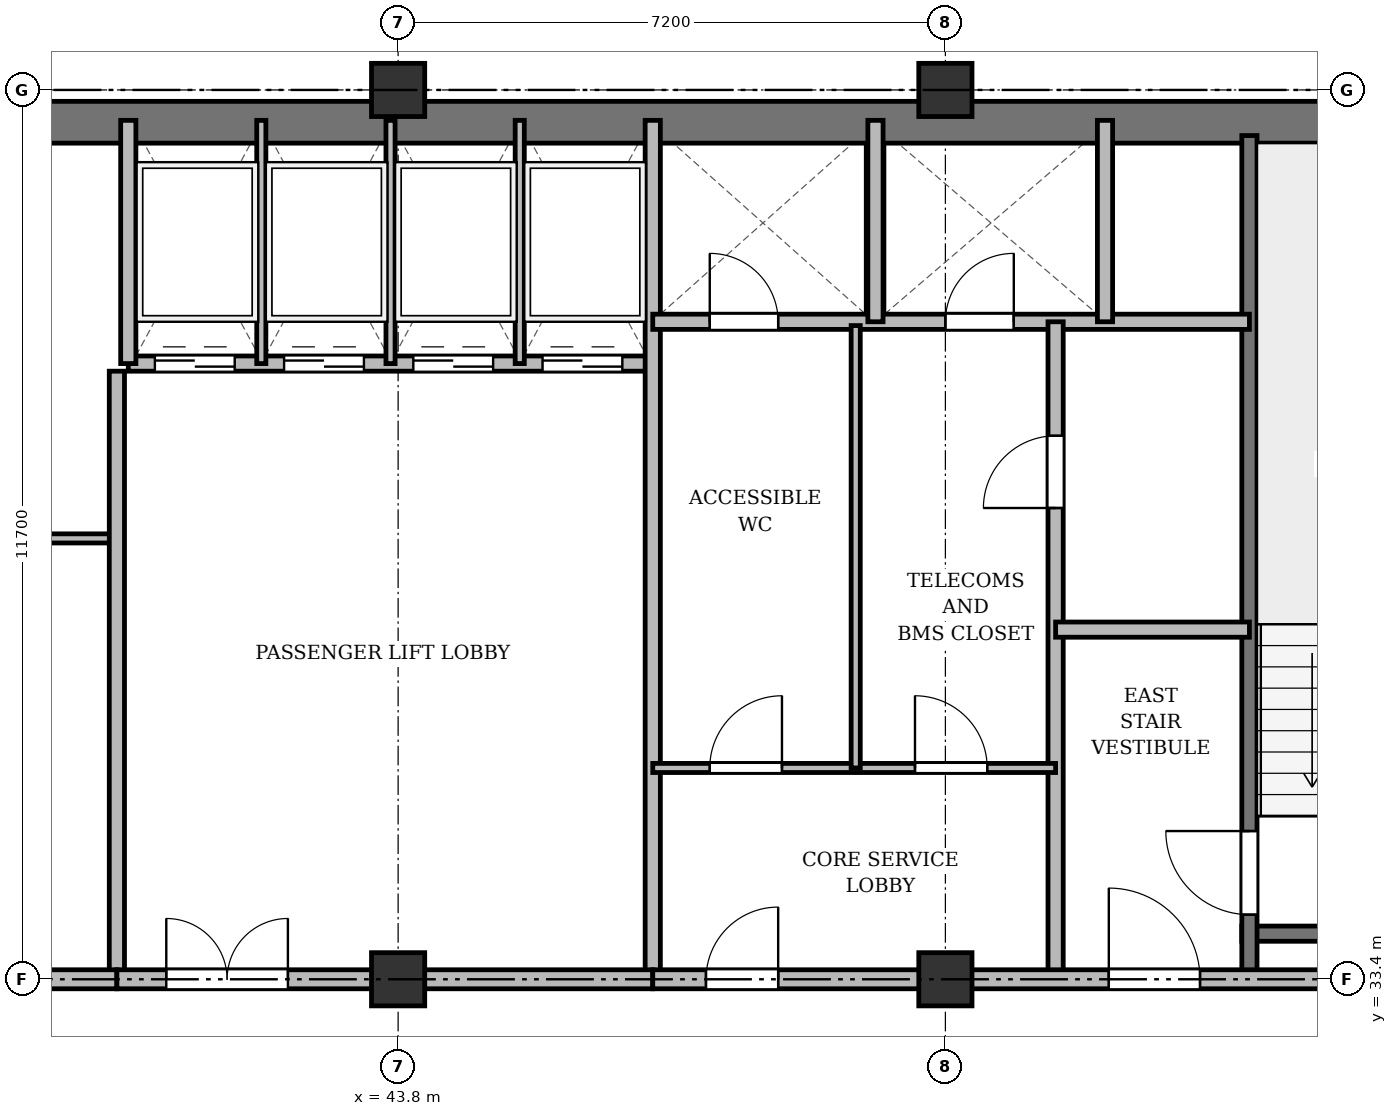
"""IFC4 building model, lengths in metres.
Left out: names, types, materials, properties, quantities, classifications, styles, units other than length and angle.
Written with IfcOpenShell. Run it as: python <this file> out.ifc"""

import sys

from ifc_helpers import new_model, si_unit, direction, frame, frame_2d, origin, origin_2d, place, context, subcontext, project, spatial, rectangle, extrude, source, transform, mapped, element, fill, save


model = new_model("IFC4")
c1 = context("Model", 3, precision=1e-05, world=origin(), true_north=direction((0.0, 1.0)))
c2 = subcontext(c1, "Body", "Model", "MODEL_VIEW")
j1 = project(units=[si_unit("LENGTHUNIT", "METRE"), si_unit("PLANEANGLEUNIT", "RADIAN")], contexts=[c1])
p1 = place(None, origin())
s1 = spatial("IfcSite", under=j1, at=p1, CompositionType="ELEMENT")
p2 = place(p1, origin())
s2 = spatial("IfcBuilding", under=s1, at=p2, CompositionType="ELEMENT")
p3 = place(p2, frame((0.0, 0.0, 237.3)))
s3 = spatial("IfcBuildingStorey", under=s2, at=p3, CompositionType="ELEMENT", Elevation=237.3)
m1 = source(origin(), c2, "Body", "SweptSolid", [
    extrude(rectangle(XDim=0.7, YDim=0.7, at=origin_2d()), origin(), (0.0, 0.0, 1.0), 3.6),
])
for number, where, z_axis, x_axis in (
    (1, (43.8, 33.4, 0.0), (0.0, 0.0, 1.0), (1.0, 0.0, 0.0)),
    (2, (43.8, 45.1, 0.0), (0.0, 0.0, 1.0), (1.0, 0.0, 0.0)),
    (3, (51.0, 33.4, 0.0), (0.0, 0.0, 1.0), (1.0, 0.0, 0.0)),
    (4, (51.0, 45.1, 0.0), (0.0, 0.0, 1.0), (1.0, 0.0, 0.0)),
):
    element("IfcColumn", number, at=place(p3, frame(where, z_axis=z_axis, x_axis=x_axis)), inside=s3, PredefinedType="COLUMN", context=c2, shape_type="MappedRepresentation", body=[
        mapped(m1, transform((0.0, 0.0, 0.0), x_axis=(1.0, 0.0, 0.0), y_axis=(0.0, 1.0, 0.0), z_axis=(0.0, 0.0, 1.0), scale=1.0)),
    ])
p4 = place(p3, frame((15.65, 44.675, 0.0), z_axis=(0.0, 0.0, 1.0), x_axis=(1.0, 0.0, 0.0)))
e5 = element("IfcWall", 5, at=p4, inside=s3, PredefinedType="SHEAR", context=c2, shape_type="SweptSolid", body=[
    extrude(rectangle(XDim=43.1, YDim=0.55, at=frame_2d((21.55, 0.0))), origin(), (0.0, 0.0, 1.0), 3.22),
])
p5 = place(p3, frame((54.9, 34.0, 0.0), z_axis=(0.0, 0.0, 1.0), x_axis=(1.0, 0.0, 0.0)))
e6 = element("IfcWall", 6, at=p5, inside=s3, PredefinedType="SHEAR", context=c2, shape_type="SweptSolid", body=[
    extrude(rectangle(XDim=3.4, YDim=0.2, at=frame_2d((1.7, 0.0))), origin(), (0.0, 0.0, 1.0), 3.22),
])
p6 = place(p3, frame((55.0, 33.4, 0.0), z_axis=(0.0, 0.0, 1.0), x_axis=(0.0, 1.0, 0.0)))
e7 = element("IfcWall", 7, at=p6, inside=s3, PredefinedType="SHEAR", context=c2, shape_type="SweptSolid", body=[
    extrude(rectangle(XDim=11.1, YDim=0.2, at=frame_2d((5.55, 0.0))), origin(), (0.0, 0.0, 1.0), 3.22),
])
p7 = place(p6, frame((0.85, 0.0, 0.0)))
e8 = element("IfcOpeningElement", 8, at=p7, cuts=e7, PredefinedType="OPENING", context=c2, shape_type="SweptSolid", body=[
    extrude(rectangle(XDim=1.1, YDim=2.15, at=frame_2d((0.55, 1.075))), frame((0.0, 0.11, 0.0), z_axis=(0.0, -1.0, 0.0), x_axis=(1.0, 0.0, 0.0)), (0.0, 0.0, 1.0), 0.22),
])
p8 = place(p3, frame((33.3, 39.2, 0.0), z_axis=(0.0, 0.0, 1.0), x_axis=(1.0, 0.0, 0.0)))
e9 = element("IfcWall", 9, at=p8, inside=s3, PredefinedType="PARTITIONING", context=c2, shape_type="SweptSolid", body=[
    extrude(rectangle(XDim=6.8, YDim=0.12, at=frame_2d((3.4, 0.0))), origin(), (0.0, 0.0, 1.0), 3.22),
])
p9 = place(p8, frame((2.6, 0.0, 0.0)))
e10 = element("IfcOpeningElement", 10, at=p9, cuts=e9, PredefinedType="OPENING", context=c2, shape_type="SweptSolid", body=[
    extrude(rectangle(XDim=0.95, YDim=2.15, at=frame_2d((0.475, 1.075))), frame((0.0, 0.07, 0.0), z_axis=(0.0, -1.0, 0.0), x_axis=(1.0, 0.0, 0.0)), (0.0, 0.0, 1.0), 0.14),
])
p10 = place(p3, frame((40.1, 33.4, 0.0), z_axis=(0.0, 0.0, 1.0), x_axis=(0.0, 1.0, 0.0)))
e11 = element("IfcWall", 11, at=p10, inside=s3, PredefinedType="SOLIDWALL", context=c2, shape_type="SweptSolid", body=[
    extrude(rectangle(XDim=8.0, YDim=0.2, at=frame_2d((4.0, 0.0))), origin(), (0.0, 0.0, 1.0), 2.77),
])
p11 = place(p3, frame((40.25, 41.5, 0.0), z_axis=(0.0, 0.0, 1.0), x_axis=(1.0, 0.0, 0.0)))
e12 = element("IfcWall", 12, at=p11, inside=s3, PredefinedType="SOLIDWALL", context=c2, shape_type="SweptSolid", body=[
    extrude(rectangle(XDim=6.9, YDim=0.2, at=frame_2d((3.45, 0.0))), origin(), (0.0, 0.0, 1.0), 3.22),
])
p12 = place(p11, frame((0.35, 0.0, 0.0)))
e13 = element("IfcOpeningElement", 13, at=p12, cuts=e12, PredefinedType="OPENING", context=c2, shape_type="SweptSolid", body=[
    extrude(rectangle(XDim=1.05, YDim=2.15, at=frame_2d((0.525, 1.075))), frame((0.0, 0.11, 0.0), z_axis=(0.0, -1.0, 0.0), x_axis=(1.0, 0.0, 0.0)), (0.0, 0.0, 1.0), 0.22),
])
p13 = place(p11, frame((2.05, 0.0, 0.0)))
e14 = element("IfcOpeningElement", 14, at=p13, cuts=e12, PredefinedType="OPENING", context=c2, shape_type="SweptSolid", body=[
    extrude(rectangle(XDim=1.05, YDim=2.15, at=frame_2d((0.525, 1.075))), frame((0.0, 0.11, 0.0), z_axis=(0.0, -1.0, 0.0), x_axis=(1.0, 0.0, 0.0)), (0.0, 0.0, 1.0), 0.22),
])
p14 = place(p11, frame((3.75, 0.0, 0.0)))
e15 = element("IfcOpeningElement", 15, at=p14, cuts=e12, PredefinedType="OPENING", context=c2, shape_type="SweptSolid", body=[
    extrude(rectangle(XDim=1.05, YDim=2.15, at=frame_2d((0.525, 1.075))), frame((0.0, 0.11, 0.0), z_axis=(0.0, -1.0, 0.0), x_axis=(1.0, 0.0, 0.0)), (0.0, 0.0, 1.0), 0.22),
])
p15 = place(p11, frame((5.45, 0.0, 0.0)))
e16 = element("IfcOpeningElement", 16, at=p15, cuts=e12, PredefinedType="OPENING", context=c2, shape_type="SweptSolid", body=[
    extrude(rectangle(XDim=1.05, YDim=2.15, at=frame_2d((0.525, 1.075))), frame((0.0, 0.11, 0.0), z_axis=(0.0, -1.0, 0.0), x_axis=(1.0, 0.0, 0.0)), (0.0, 0.0, 1.0), 0.22),
])
p16 = place(p3, frame((40.25, 41.5, 0.0), z_axis=(0.0, 0.0, 1.0), x_axis=(0.0, 1.0, 0.0)))
e17 = element("IfcWall", 17, at=p16, inside=s3, PredefinedType="SOLIDWALL", context=c2, shape_type="SweptSolid", body=[
    extrude(rectangle(XDim=3.2, YDim=0.2, at=frame_2d((1.6, 0.0))), origin(), (0.0, 0.0, 1.0), 3.22),
])
for number, where, z_axis, x_axis in (
    (18, (42.0, 41.5, 0.0), (0.0, 0.0, 1.0), (0.0, 1.0, 0.0)),
    (19, (43.7, 41.5, 0.0), (0.0, 0.0, 1.0), (0.0, 1.0, 0.0)),
    (20, (45.4, 41.5, 0.0), (0.0, 0.0, 1.0), (0.0, 1.0, 0.0)),
):
    element("IfcWall", number, at=place(p3, frame(where, z_axis=z_axis, x_axis=x_axis)), inside=s3, PredefinedType="PARTITIONING", context=c2, shape_type="SweptSolid", body=[
        extrude(rectangle(XDim=3.2, YDim=0.12, at=frame_2d((1.6, 0.0))), origin(), (0.0, 0.0, 1.0), 3.22),
    ])
p17 = place(p3, frame((47.15, 33.4, 0.0), z_axis=(0.0, 0.0, 1.0), x_axis=(0.0, 1.0, 0.0)))
e21 = element("IfcWall", 21, at=p17, inside=s3, PredefinedType="SOLIDWALL", context=c2, shape_type="SweptSolid", body=[
    extrude(rectangle(XDim=11.3, YDim=0.2, at=frame_2d((5.65, 0.0))), origin(), (0.0, 0.0, 1.0), 2.77),
])
p18 = place(p3, frame((33.3, 33.4, 0.0), z_axis=(0.0, 0.0, 1.0), x_axis=(1.0, 0.0, 0.0)))
e22 = element("IfcWall", 22, at=p18, inside=s3, PredefinedType="PARTITIONING", context=c2, shape_type="SweptSolid", body=[
    extrude(rectangle(XDim=6.8, YDim=0.25, at=frame_2d((3.4, 0.0))), origin(), (0.0, 0.0, 1.0), 2.77),
])
p19 = place(p18, frame((2.4, 0.0, 0.0)))
e23 = element("IfcOpeningElement", 23, at=p19, cuts=e22, PredefinedType="OPENING", context=c2, shape_type="SweptSolid", body=[
    extrude(rectangle(XDim=1.0, YDim=2.15, at=frame_2d((0.5, 1.075))), frame((0.0, 0.135, 0.0), z_axis=(0.0, -1.0, 0.0), x_axis=(1.0, 0.0, 0.0)), (0.0, 0.0, 1.0), 0.27),
])
p20 = place(p3, frame((40.1, 33.4, 0.0), z_axis=(0.0, 0.0, 1.0), x_axis=(1.0, 0.0, 0.0)))
e24 = element("IfcWall", 24, at=p20, inside=s3, PredefinedType="PARTITIONING", context=c2, shape_type="SweptSolid", body=[
    extrude(rectangle(XDim=7.05, YDim=0.25, at=frame_2d((3.525, 0.0))), origin(), (0.0, 0.0, 1.0), 2.77),
])
p21 = place(p20, frame((0.65, 0.0, 0.0)))
e25 = element("IfcOpeningElement", 25, at=p21, cuts=e24, PredefinedType="OPENING", context=c2, shape_type="SweptSolid", body=[
    extrude(rectangle(XDim=1.6, YDim=2.2, at=frame_2d((0.8, 1.1))), frame((0.0, 0.135, 0.0), z_axis=(0.0, -1.0, 0.0), x_axis=(1.0, 0.0, 0.0)), (0.0, 0.0, 1.0), 0.27),
])
p22 = place(p3, frame((47.15, 42.05, 0.0), z_axis=(0.0, 0.0, 1.0), x_axis=(1.0, 0.0, 0.0)))
e26 = element("IfcWall", 26, at=p22, inside=s3, PredefinedType="SOLIDWALL", context=c2, shape_type="SweptSolid", body=[
    extrude(rectangle(XDim=7.85, YDim=0.2, at=frame_2d((3.925, 0.0))), origin(), (0.0, 0.0, 1.0), 2.72),
])
p23 = place(p22, frame((0.75, 0.0, 0.0)))
e27 = element("IfcOpeningElement", 27, at=p23, cuts=e26, PredefinedType="OPENING", context=c2, shape_type="SweptSolid", body=[
    extrude(rectangle(XDim=0.9, YDim=2.1, at=frame_2d((0.45, 1.05))), frame((0.0, 0.11, 0.0), z_axis=(0.0, -1.0, 0.0), x_axis=(1.0, 0.0, 0.0)), (0.0, 0.0, 1.0), 0.22),
])
p24 = place(p22, frame((3.85, 0.0, 0.0)))
e28 = element("IfcOpeningElement", 28, at=p24, cuts=e26, PredefinedType="OPENING", context=c2, shape_type="SweptSolid", body=[
    extrude(rectangle(XDim=0.9, YDim=2.1, at=frame_2d((0.45, 1.05))), frame((0.0, 0.11, 0.0), z_axis=(0.0, -1.0, 0.0), x_axis=(1.0, 0.0, 0.0)), (0.0, 0.0, 1.0), 0.22),
])
for number, where, z_axis, x_axis in (
    (29, (50.08, 42.05, 0.0), (0.0, 0.0, 1.0), (0.0, 1.0, 0.0)),
    (30, (53.1, 42.05, 0.0), (0.0, 0.0, 1.0), (0.0, 1.0, 0.0)),
):
    element("IfcWall", number, at=place(p3, frame(where, z_axis=z_axis, x_axis=x_axis)), inside=s3, PredefinedType="SOLIDWALL", context=c2, shape_type="SweptSolid", body=[
        extrude(rectangle(XDim=2.65, YDim=0.2, at=frame_2d((1.325, 0.0))), origin(), (0.0, 0.0, 1.0), 3.22),
    ])
p25 = place(p3, frame((52.45, 33.4, 0.0), z_axis=(0.0, 0.0, 1.0), x_axis=(0.0, 1.0, 0.0)))
e31 = element("IfcWall", 31, at=p25, inside=s3, PredefinedType="PARTITIONING", context=c2, shape_type="SweptSolid", body=[
    extrude(rectangle(XDim=8.65, YDim=0.2, at=frame_2d((4.325, 0.0))), origin(), (0.0, 0.0, 1.0), 2.77),
])
p26 = place(p25, frame((6.2, 0.0, 0.0)))
e32 = element("IfcOpeningElement", 32, at=p26, cuts=e31, PredefinedType="OPENING", context=c2, shape_type="SweptSolid", body=[
    extrude(rectangle(XDim=0.95, YDim=2.15, at=frame_2d((0.475, 1.075))), frame((0.0, 0.11, 0.0), z_axis=(0.0, -1.0, 0.0), x_axis=(1.0, 0.0, 0.0)), (0.0, 0.0, 1.0), 0.22),
])
p27 = place(p3, frame((52.45, 38.0, 0.0), z_axis=(0.0, 0.0, 1.0), x_axis=(1.0, 0.0, 0.0)))
e33 = element("IfcWall", 33, at=p27, inside=s3, PredefinedType="PARTITIONING", context=c2, shape_type="SweptSolid", body=[
    extrude(rectangle(XDim=2.55, YDim=0.2, at=frame_2d((1.275, 0.0))), origin(), (0.0, 0.0, 1.0), 3.22),
])
p28 = place(p3, frame((47.15, 36.18, 0.0), z_axis=(0.0, 0.0, 1.0), x_axis=(1.0, 0.0, 0.0)))
e34 = element("IfcWall", 34, at=p28, inside=s3, PredefinedType="PARTITIONING", context=c2, shape_type="SweptSolid", body=[
    extrude(rectangle(XDim=5.3, YDim=0.12, at=frame_2d((2.65, 0.0))), origin(), (0.0, 0.0, 1.0), 2.72),
])
p29 = place(p28, frame((0.75, 0.0, 0.0)))
e35 = element("IfcOpeningElement", 35, at=p29, cuts=e34, PredefinedType="OPENING", context=c2, shape_type="SweptSolid", body=[
    extrude(rectangle(XDim=0.95, YDim=2.15, at=frame_2d((0.475, 1.075))), frame((0.0, 0.07, 0.0), z_axis=(0.0, -1.0, 0.0), x_axis=(1.0, 0.0, 0.0)), (0.0, 0.0, 1.0), 0.14),
])
p30 = place(p28, frame((3.45, 0.0, 0.0)))
e36 = element("IfcOpeningElement", 36, at=p30, cuts=e34, PredefinedType="OPENING", context=c2, shape_type="SweptSolid", body=[
    extrude(rectangle(XDim=0.95, YDim=2.15, at=frame_2d((0.475, 1.075))), frame((0.0, 0.07, 0.0), z_axis=(0.0, -1.0, 0.0), x_axis=(1.0, 0.0, 0.0)), (0.0, 0.0, 1.0), 0.14),
])
p31 = place(p3, frame((49.82, 36.18, 0.0), z_axis=(0.0, 0.0, 1.0), x_axis=(0.0, 1.0, 0.0)))
e37 = element("IfcWall", 37, at=p31, inside=s3, PredefinedType="PARTITIONING", context=c2, shape_type="SweptSolid", body=[
    extrude(rectangle(XDim=5.82, YDim=0.12, at=frame_2d((2.91, 0.0))), origin(), (0.0, 0.0, 1.0), 3.22),
])
p32 = place(p3, frame((47.15, 33.4, 0.0), z_axis=(0.0, 0.0, 1.0), x_axis=(1.0, 0.0, 0.0)))
e38 = element("IfcWall", 38, at=p32, inside=s3, PredefinedType="PARTITIONING", context=c2, shape_type="SweptSolid", body=[
    extrude(rectangle(XDim=11.15, YDim=0.25, at=frame_2d((5.575, 0.0))), origin(), (0.0, 0.0, 1.0), 2.77),
])
p33 = place(p32, frame((0.7, 0.0, 0.0)))
e39 = element("IfcOpeningElement", 39, at=p33, cuts=e38, PredefinedType="OPENING", context=c2, shape_type="SweptSolid", body=[
    extrude(rectangle(XDim=0.95, YDim=2.15, at=frame_2d((0.475, 1.075))), frame((0.0, 0.135, 0.0), z_axis=(0.0, -1.0, 0.0), x_axis=(1.0, 0.0, 0.0)), (0.0, 0.0, 1.0), 0.27),
])
p34 = place(p32, frame((6.0, 0.0, 0.0)))
e40 = element("IfcOpeningElement", 40, at=p34, cuts=e38, PredefinedType="OPENING", context=c2, shape_type="SweptSolid", body=[
    extrude(rectangle(XDim=1.2, YDim=2.15, at=frame_2d((0.6, 1.075))), frame((0.0, 0.135, 0.0), z_axis=(0.0, -1.0, 0.0), x_axis=(1.0, 0.0, 0.0)), (0.0, 0.0, 1.0), 0.27),
])
m2 = source(origin(), c2, "Body", "SweptSolid", [
    extrude(rectangle(XDim=1.1, YDim=2.15, at=frame_2d((0.55, 1.075))), frame((0.0, 0.025, 0.0), z_axis=(0.0, -1.0, 0.0), x_axis=(1.0, 0.0, 0.0)), (0.0, 0.0, 1.0), 0.05),
])
p35 = place(p7, origin())
e41 = element("IfcDoor", 41, at=p35, inside=s3, OperationType="SINGLE_SWING_RIGHT", PredefinedType="DOOR", context=c2, shape_type="MappedRepresentation", body=[
    mapped(m2, transform((0.0, 0.0, 0.0), x_axis=(1.0, 0.0, 0.0), y_axis=(0.0, 1.0, 0.0), z_axis=(0.0, 0.0, 1.0), scale=1.0)),
])
fill(e8, e41)
m3 = source(origin(), c2, "Body", "SweptSolid", [
    extrude(rectangle(XDim=1.05, YDim=2.15, at=frame_2d((0.525, 1.075))), frame((0.0, 0.025, 0.0), z_axis=(0.0, -1.0, 0.0), x_axis=(1.0, 0.0, 0.0)), (0.0, 0.0, 1.0), 0.05),
])
p36 = place(p12, origin())
e42 = element("IfcDoor", 42, at=p36, inside=s3, OperationType="DOUBLE_DOOR_SLIDING", PredefinedType="DOOR", context=c2, shape_type="MappedRepresentation", body=[
    mapped(m3, transform((0.0, 0.0, 0.0), x_axis=(1.0, 0.0, 0.0), y_axis=(0.0, 1.0, 0.0), z_axis=(0.0, 0.0, 1.0), scale=1.0)),
])
fill(e13, e42)
p37 = place(p13, origin())
e43 = element("IfcDoor", 43, at=p37, inside=s3, OperationType="DOUBLE_DOOR_SLIDING", PredefinedType="DOOR", context=c2, shape_type="MappedRepresentation", body=[
    mapped(m3, transform((0.0, 0.0, 0.0), x_axis=(1.0, 0.0, 0.0), y_axis=(0.0, 1.0, 0.0), z_axis=(0.0, 0.0, 1.0), scale=1.0)),
])
fill(e14, e43)
p38 = place(p14, origin())
e44 = element("IfcDoor", 44, at=p38, inside=s3, OperationType="DOUBLE_DOOR_SLIDING", PredefinedType="DOOR", context=c2, shape_type="MappedRepresentation", body=[
    mapped(m3, transform((0.0, 0.0, 0.0), x_axis=(1.0, 0.0, 0.0), y_axis=(0.0, 1.0, 0.0), z_axis=(0.0, 0.0, 1.0), scale=1.0)),
])
fill(e15, e44)
p39 = place(p15, origin())
e45 = element("IfcDoor", 45, at=p39, inside=s3, OperationType="DOUBLE_DOOR_SLIDING", PredefinedType="DOOR", context=c2, shape_type="MappedRepresentation", body=[
    mapped(m3, transform((0.0, 0.0, 0.0), x_axis=(1.0, 0.0, 0.0), y_axis=(0.0, 1.0, 0.0), z_axis=(0.0, 0.0, 1.0), scale=1.0)),
])
fill(e16, e45)
m4 = source(origin(), c2, "Body", "SweptSolid", [
    extrude(rectangle(XDim=1.6, YDim=2.2, at=frame_2d((0.8, 1.1))), frame((0.0, 0.025, 0.0), z_axis=(0.0, -1.0, 0.0), x_axis=(1.0, 0.0, 0.0)), (0.0, 0.0, 1.0), 0.05),
])
p40 = place(p21, origin())
e46 = element("IfcDoor", 46, at=p40, inside=s3, OperationType="DOUBLE_DOOR_SINGLE_SWING", PredefinedType="DOOR", context=c2, shape_type="MappedRepresentation", body=[
    mapped(m4, transform((0.0, 0.0, 0.0), x_axis=(1.0, 0.0, 0.0), y_axis=(0.0, 1.0, 0.0), z_axis=(0.0, 0.0, 1.0), scale=1.0)),
])
fill(e25, e46)
m5 = source(origin(), c2, "Body", "SweptSolid", [
    extrude(rectangle(XDim=0.9, YDim=2.1, at=frame_2d((0.45, 1.05))), frame((0.0, 0.025, 0.0), z_axis=(0.0, -1.0, 0.0), x_axis=(1.0, 0.0, 0.0)), (0.0, 0.0, 1.0), 0.05),
])
p41 = place(p23, origin())
e47 = element("IfcDoor", 47, at=p41, inside=s3, OperationType="SINGLE_SWING_LEFT", PredefinedType="DOOR", context=c2, shape_type="MappedRepresentation", body=[
    mapped(m5, transform((0.0, 0.0, 0.0), x_axis=(1.0, 0.0, 0.0), y_axis=(0.0, 1.0, 0.0), z_axis=(0.0, 0.0, 1.0), scale=1.0)),
])
fill(e27, e47)
p42 = place(p24, origin())
e48 = element("IfcDoor", 48, at=p42, inside=s3, OperationType="SINGLE_SWING_RIGHT", PredefinedType="DOOR", context=c2, shape_type="MappedRepresentation", body=[
    mapped(m5, transform((0.0, 0.0, 0.0), x_axis=(1.0, 0.0, 0.0), y_axis=(0.0, 1.0, 0.0), z_axis=(0.0, 0.0, 1.0), scale=1.0)),
])
fill(e28, e48)
m6 = source(origin(), c2, "Body", "SweptSolid", [
    extrude(rectangle(XDim=0.95, YDim=2.15, at=frame_2d((0.475, 1.075))), frame((0.0, 0.025, 0.0), z_axis=(0.0, -1.0, 0.0), x_axis=(1.0, 0.0, 0.0)), (0.0, 0.0, 1.0), 0.05),
])
p43 = place(p26, origin())
e49 = element("IfcDoor", 49, at=p43, inside=s3, OperationType="SINGLE_SWING_LEFT", PredefinedType="DOOR", context=c2, shape_type="MappedRepresentation", body=[
    mapped(m6, transform((0.0, 0.0, 0.0), x_axis=(1.0, 0.0, 0.0), y_axis=(0.0, 1.0, 0.0), z_axis=(0.0, 0.0, 1.0), scale=1.0)),
])
fill(e32, e49)
p44 = place(p29, origin())
e50 = element("IfcDoor", 50, at=p44, inside=s3, OperationType="SINGLE_SWING_RIGHT", PredefinedType="DOOR", context=c2, shape_type="MappedRepresentation", body=[
    mapped(m6, transform((0.0, 0.0, 0.0), x_axis=(1.0, 0.0, 0.0), y_axis=(0.0, 1.0, 0.0), z_axis=(0.0, 0.0, 1.0), scale=1.0)),
])
fill(e35, e50)
p45 = place(p30, origin())
e51 = element("IfcDoor", 51, at=p45, inside=s3, OperationType="SINGLE_SWING_LEFT", PredefinedType="DOOR", context=c2, shape_type="MappedRepresentation", body=[
    mapped(m6, transform((0.0, 0.0, 0.0), x_axis=(1.0, 0.0, 0.0), y_axis=(0.0, 1.0, 0.0), z_axis=(0.0, 0.0, 1.0), scale=1.0)),
])
fill(e36, e51)
p46 = place(p33, origin())
e52 = element("IfcDoor", 52, at=p46, inside=s3, OperationType="SINGLE_SWING_RIGHT", PredefinedType="DOOR", context=c2, shape_type="MappedRepresentation", body=[
    mapped(m6, transform((0.0, 0.0, 0.0), x_axis=(1.0, 0.0, 0.0), y_axis=(0.0, 1.0, 0.0), z_axis=(0.0, 0.0, 1.0), scale=1.0)),
])
fill(e39, e52)
m7 = source(origin(), c2, "Body", "SweptSolid", [
    extrude(rectangle(XDim=1.2, YDim=2.15, at=frame_2d((0.6, 1.075))), frame((0.0, 0.025, 0.0), z_axis=(0.0, -1.0, 0.0), x_axis=(1.0, 0.0, 0.0)), (0.0, 0.0, 1.0), 0.05),
])
p47 = place(p34, origin())
e53 = element("IfcDoor", 53, at=p47, inside=s3, OperationType="SINGLE_SWING_LEFT", PredefinedType="DOOR", context=c2, shape_type="MappedRepresentation", body=[
    mapped(m7, transform((0.0, 0.0, 0.0), x_axis=(1.0, 0.0, 0.0), y_axis=(0.0, 1.0, 0.0), z_axis=(0.0, 0.0, 1.0), scale=1.0)),
])
fill(e40, e53)
save(model, sys.argv[1])
